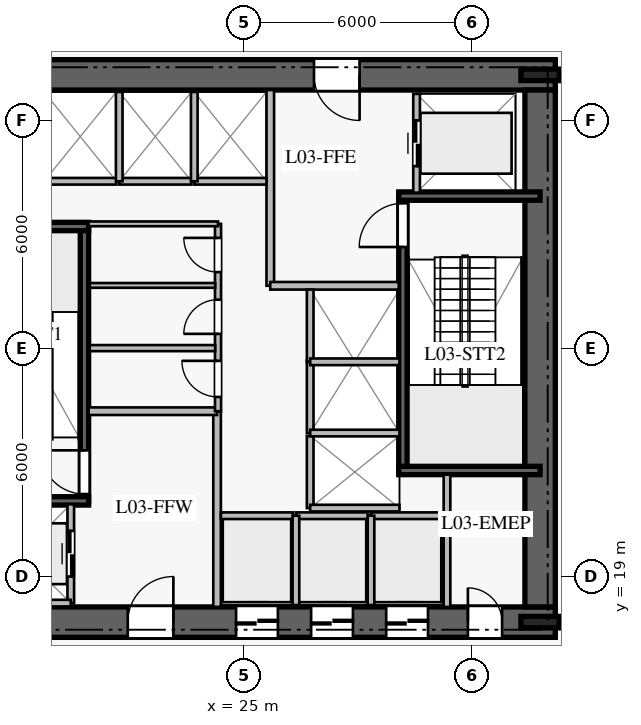
"""IFC4 building model, lengths in metres.
Left out: names, types, materials, properties, quantities, classifications, styles, units other than length and angle.
Written with IfcOpenShell. Run it as: python <this file> out.ifc"""

import sys

from ifc_helpers import new_model, si_unit, direction, frame, frame_2d, origin, origin_2d, place, context, subcontext, project, spatial, rectangle, i_section, extrude, element, fill, save


model = new_model("IFC4")
c1 = context("Model", 3, precision=1e-05, world=origin(), true_north=direction((0.0, 1.0)))
c2 = subcontext(c1, "Body", "Model", "MODEL_VIEW")
j1 = project(units=[si_unit("LENGTHUNIT", "METRE"), si_unit("PLANEANGLEUNIT", "RADIAN")], contexts=[c1])
p1 = place(None, origin())
s1 = spatial("IfcSite", under=j1, at=p1, CompositionType="ELEMENT")
p2 = place(p1, origin())
s2 = spatial("IfcBuilding", under=s1, at=p2, CompositionType="ELEMENT")
p3 = place(p2, frame((0.0, 0.0, 14.4)))
s3 = spatial("IfcBuildingStorey", under=s2, at=p3, CompositionType="ELEMENT", Elevation=14.4)
p4 = place(p3, frame((16.8, 17.8, 0.0), z_axis=(0.0, 0.0, 1.0), x_axis=(1.0, 0.0, 0.0)))
e1 = element("IfcWall", 1, at=p4, inside=s3, PredefinedType="SHEAR", context=c2, shape_type="SweptSolid", body=[
    extrude(rectangle(XDim=16.4, YDim=0.8, at=frame_2d((8.2, 0.0))), origin(), (0.0, 0.0, 1.0), 4.3),
])
p5 = place(p4, frame((5.15, 0.0, 0.0)))
e2 = element("IfcOpeningElement", 2, at=p5, cuts=e1, PredefinedType="OPENING", context=c2, shape_type="SweptSolid", body=[
    extrude(rectangle(XDim=1.2, YDim=2.25, at=frame_2d((0.6, 1.125))), frame((0.0, 0.41, 0.0), z_axis=(0.0, -1.0, 0.0), x_axis=(1.0, 0.0, 0.0)), (0.0, 0.0, 1.0), 0.82),
])
p6 = place(p4, frame((14.1, 0.0, 0.0)))
e3 = element("IfcOpeningElement", 3, at=p6, cuts=e1, PredefinedType="OPENING", context=c2, shape_type="SweptSolid", body=[
    extrude(rectangle(XDim=0.9, YDim=2.1, at=frame_2d((0.45, 1.05))), frame((0.0, 0.41, 0.0), z_axis=(0.0, -1.0, 0.0), x_axis=(1.0, 0.0, 0.0)), (0.0, 0.0, 1.0), 0.82),
])
p7 = place(p4, frame((8.0, 0.0, 0.0)))
e4 = element("IfcOpeningElement", 4, at=p7, cuts=e1, PredefinedType="OPENING", context=c2, shape_type="SweptSolid", body=[
    extrude(rectangle(XDim=1.1, YDim=2.2, at=frame_2d((0.55, 1.1))), frame((0.0, 0.41, 0.0), z_axis=(0.0, -1.0, 0.0), x_axis=(1.0, 0.0, 0.0)), (0.0, 0.0, 1.0), 0.82),
])
p8 = place(p4, frame((9.975, 0.0, 0.0)))
e5 = element("IfcOpeningElement", 5, at=p8, cuts=e1, PredefinedType="OPENING", context=c2, shape_type="SweptSolid", body=[
    extrude(rectangle(XDim=1.1, YDim=2.2, at=frame_2d((0.55, 1.1))), frame((0.0, 0.41, 0.0), z_axis=(0.0, -1.0, 0.0), x_axis=(1.0, 0.0, 0.0)), (0.0, 0.0, 1.0), 0.82),
])
p9 = place(p4, frame((11.95, 0.0, 0.0)))
e6 = element("IfcOpeningElement", 6, at=p9, cuts=e1, PredefinedType="OPENING", context=c2, shape_type="SweptSolid", body=[
    extrude(rectangle(XDim=1.1, YDim=2.2, at=frame_2d((0.55, 1.1))), frame((0.0, 0.41, 0.0), z_axis=(0.0, -1.0, 0.0), x_axis=(1.0, 0.0, 0.0)), (0.0, 0.0, 1.0), 0.82),
])
p10 = place(p3, frame((33.2, 32.2, 0.0), z_axis=(0.0, 0.0, 1.0), x_axis=(-1.0, 0.0, 0.0)))
e7 = element("IfcWall", 7, at=p10, inside=s3, PredefinedType="SHEAR", context=c2, shape_type="SweptSolid", body=[
    extrude(rectangle(XDim=16.4, YDim=0.8, at=frame_2d((8.2, 0.0))), origin(), (0.0, 0.0, 1.0), 4.3),
])
p11 = place(p10, frame((5.15, 0.0, 0.0)))
e8 = element("IfcOpeningElement", 8, at=p11, cuts=e7, PredefinedType="OPENING", context=c2, shape_type="SweptSolid", body=[
    extrude(rectangle(XDim=1.2, YDim=2.25, at=frame_2d((0.6, 1.125))), frame((0.0, 0.41, 0.0), z_axis=(0.0, -1.0, 0.0), x_axis=(1.0, 0.0, 0.0)), (0.0, 0.0, 1.0), 0.82),
])
p12 = place(p3, frame((32.8, 18.2, 0.0), z_axis=(0.0, 0.0, 1.0), x_axis=(0.0, 1.0, 0.0)))
e9 = element("IfcWall", 9, at=p12, inside=s3, PredefinedType="SHEAR", context=c2, shape_type="SweptSolid", body=[
    extrude(rectangle(XDim=13.6, YDim=0.8, at=frame_2d((6.8, 0.0))), origin(), (0.0, 0.0, 1.0), 4.3),
])
for number, where, z_axis, x_axis in (
    (10, (32.8, 17.8, 0.0), (0.0, 0.0, 1.0), (1.0, 0.0, 0.0)),
    (11, (32.8, 32.2, 0.0), (0.0, 0.0, 1.0), (1.0, 0.0, 0.0)),
):
    element("IfcColumn", number, at=place(p3, frame(where, z_axis=z_axis, x_axis=x_axis)), inside=s3, PredefinedType="COLUMN", context=c2, shape_type="SweptSolid", body=[
        extrude(i_section(OverallWidth=0.302, OverallDepth=1.008, WebThickness=0.021, FlangeThickness=0.04, at=origin_2d()), origin(), (0.0, 0.0, 1.0), 4.6),
    ])
p13 = place(p3, frame((20.81, 20.99, 0.0), z_axis=(0.0, 0.0, 1.0), x_axis=(0.0, 1.0, 0.0)))
e12 = element("IfcWall", 12, at=p13, inside=s3, PredefinedType="SOLIDWALL", context=c2, shape_type="SweptSolid", body=[
    extrude(rectangle(XDim=7.22, YDim=0.22, at=frame_2d((3.61, 0.0))), origin(), (0.0, 0.0, 1.0), 4.3),
])
p14 = place(p13, frame((0.18, 0.0, 0.0)))
e13 = element("IfcOpeningElement", 13, at=p14, cuts=e12, PredefinedType="OPENING", context=c2, shape_type="SweptSolid", body=[
    extrude(rectangle(XDim=1.15, YDim=2.2, at=frame_2d((0.575, 1.1))), frame((0.0, 0.12, 0.0), z_axis=(0.0, -1.0, 0.0), x_axis=(1.0, 0.0, 0.0)), (0.0, 0.0, 1.0), 0.24),
])
for number, where, z_axis, x_axis in (
    (14, (17.2, 20.99, 0.0), (0.0, 0.0, 1.0), (1.0, 0.0, 0.0)),
    (15, (17.2, 28.21, 0.0), (0.0, 0.0, 1.0), (1.0, 0.0, 0.0)),
):
    element("IfcWall", number, at=place(p3, frame(where, z_axis=z_axis, x_axis=x_axis)), inside=s3, PredefinedType="SOLIDWALL", context=c2, shape_type="SweptSolid", body=[
        extrude(rectangle(XDim=3.72, YDim=0.22, at=frame_2d((1.86, 0.0))), origin(), (0.0, 0.0, 1.0), 4.3),
    ])
p15 = place(p3, frame((29.19, 21.79, 0.0), z_axis=(0.0, 0.0, 1.0), x_axis=(0.0, 1.0, 0.0)))
e16 = element("IfcWall", 16, at=p15, inside=s3, PredefinedType="SOLIDWALL", context=c2, shape_type="SweptSolid", body=[
    extrude(rectangle(XDim=7.22, YDim=0.22, at=frame_2d((3.61, 0.0))), origin(), (0.0, 0.0, 1.0), 4.3),
])
p16 = place(p15, frame((5.88, 0.0, 0.0)))
e17 = element("IfcOpeningElement", 17, at=p16, cuts=e16, PredefinedType="OPENING", context=c2, shape_type="SweptSolid", body=[
    extrude(rectangle(XDim=1.15, YDim=2.2, at=frame_2d((0.575, 1.1))), frame((0.0, 0.12, 0.0), z_axis=(0.0, -1.0, 0.0), x_axis=(1.0, 0.0, 0.0)), (0.0, 0.0, 1.0), 0.24),
])
for number, where, z_axis, x_axis in (
    (18, (29.08, 21.79, 0.0), (0.0, 0.0, 1.0), (1.0, 0.0, 0.0)),
    (19, (29.08, 29.01, 0.0), (0.0, 0.0, 1.0), (1.0, 0.0, 0.0)),
):
    element("IfcWall", number, at=place(p3, frame(where, z_axis=z_axis, x_axis=x_axis)), inside=s3, PredefinedType="SOLIDWALL", context=c2, shape_type="SweptSolid", body=[
        extrude(rectangle(XDim=3.72, YDim=0.22, at=frame_2d((1.86, 0.0))), origin(), (0.0, 0.0, 1.0), 4.3),
    ])
p17 = place(p3, frame((24.3, 18.2, 0.0), z_axis=(0.0, 0.0, 1.0), x_axis=(0.0, 1.0, 0.0)))
e20 = element("IfcWall", 20, at=p17, inside=s3, PredefinedType="PARTITIONING", context=c2, shape_type="SweptSolid", body=[
    extrude(rectangle(XDim=5.15, YDim=0.2, at=frame_2d((2.575, 0.0))), origin(), (0.0, 0.0, 1.0), 4.3),
])
p18 = place(p3, frame((20.92, 23.35, 0.0), z_axis=(0.0, 0.0, 1.0), x_axis=(1.0, 0.0, 0.0)))
e21 = element("IfcWall", 21, at=p18, inside=s3, PredefinedType="PARTITIONING", context=c2, shape_type="SweptSolid", body=[
    extrude(rectangle(XDim=3.38, YDim=0.2, at=frame_2d((1.69, 0.0))), origin(), (0.0, 0.0, 1.0), 4.3),
])
p19 = place(p3, frame((25.7, 26.65, 0.0), z_axis=(0.0, 0.0, 1.0), x_axis=(0.0, 1.0, 0.0)))
e22 = element("IfcWall", 22, at=p19, inside=s3, PredefinedType="PARTITIONING", context=c2, shape_type="SweptSolid", body=[
    extrude(rectangle(XDim=5.15, YDim=0.2, at=frame_2d((2.575, 0.0))), origin(), (0.0, 0.0, 1.0), 4.3),
])
p20 = place(p3, frame((25.7, 26.65, 0.0), z_axis=(0.0, 0.0, 1.0), x_axis=(1.0, 0.0, 0.0)))
e23 = element("IfcWall", 23, at=p20, inside=s3, PredefinedType="PARTITIONING", context=c2, shape_type="SweptSolid", body=[
    extrude(rectangle(XDim=3.38, YDim=0.2, at=frame_2d((1.69, 0.0))), origin(), (0.0, 0.0, 1.0), 4.3),
])
p21 = place(p3, frame((24.325, 23.35, 0.0), z_axis=(0.0, 0.0, 1.0), x_axis=(0.0, 1.0, 0.0)))
e24 = element("IfcWall", 24, at=p21, inside=s3, PredefinedType="PLUMBINGWALL", context=c2, shape_type="SweptSolid", body=[
    extrude(rectangle(XDim=4.93, YDim=0.16, at=frame_2d((2.465, 0.0))), origin(), (0.0, 0.0, 1.0), 4.3),
])
p22 = place(p21, frame((0.375, 0.0, 0.0)))
e25 = element("IfcOpeningElement", 25, at=p22, cuts=e24, PredefinedType="OPENING", context=c2, shape_type="SweptSolid", body=[
    extrude(rectangle(XDim=0.95, YDim=2.1, at=frame_2d((0.475, 1.05))), frame((0.0, 0.09, 0.0), z_axis=(0.0, -1.0, 0.0), x_axis=(1.0, 0.0, 0.0)), (0.0, 0.0, 1.0), 0.18),
])
p23 = place(p21, frame((2.035, 0.0, 0.0)))
e26 = element("IfcOpeningElement", 26, at=p23, cuts=e24, PredefinedType="OPENING", context=c2, shape_type="SweptSolid", body=[
    extrude(rectangle(XDim=0.9, YDim=2.1, at=frame_2d((0.45, 1.05))), frame((0.0, 0.09, 0.0), z_axis=(0.0, -1.0, 0.0), x_axis=(1.0, 0.0, 0.0)), (0.0, 0.0, 1.0), 0.18),
])
p24 = place(p21, frame((3.66, 0.0, 0.0)))
e27 = element("IfcOpeningElement", 27, at=p24, cuts=e24, PredefinedType="OPENING", context=c2, shape_type="SweptSolid", body=[
    extrude(rectangle(XDim=0.9, YDim=2.1, at=frame_2d((0.45, 1.05))), frame((0.0, 0.09, 0.0), z_axis=(0.0, -1.0, 0.0), x_axis=(1.0, 0.0, 0.0)), (0.0, 0.0, 1.0), 0.18),
])
p25 = place(p3, frame((20.92, 28.28, 0.0), z_axis=(0.0, 0.0, 1.0), x_axis=(1.0, 0.0, 0.0)))
e28 = element("IfcWall", 28, at=p25, inside=s3, PredefinedType="PARTITIONING", context=c2, shape_type="SweptSolid", body=[
    extrude(rectangle(XDim=3.405, YDim=0.125, at=frame_2d((1.703, 0.0))), origin(), (0.0, 0.0, 1.0), 4.3),
])
p26 = place(p3, frame((20.95, 25.01, 0.0), z_axis=(0.0, 0.0, 1.0), x_axis=(1.0, 0.0, 0.0)))
e29 = element("IfcWall", 29, at=p26, inside=s3, PredefinedType="PLUMBINGWALL", context=c2, shape_type="SweptSolid", body=[
    extrude(rectangle(XDim=3.3, YDim=0.16, at=frame_2d((1.65, 0.0))), origin(), (0.0, 0.0, 1.0), 4.3),
])
p27 = place(p3, frame((20.95, 26.66, 0.0), z_axis=(0.0, 0.0, 1.0), x_axis=(1.0, 0.0, 0.0)))
e30 = element("IfcWall", 30, at=p27, inside=s3, PredefinedType="PARTITIONING", context=c2, shape_type="SweptSolid", body=[
    extrude(rectangle(XDim=3.3, YDim=0.125, at=frame_2d((1.65, 0.0))), origin(), (0.0, 0.0, 1.0), 4.3),
])
p28 = place(p3, frame((30.35, 18.2, 0.0), z_axis=(0.0, 0.0, 1.0), x_axis=(0.0, 1.0, 0.0)))
e31 = element("IfcWall", 31, at=p28, inside=s3, PredefinedType="PARTITIONING", context=c2, shape_type="SweptSolid", body=[
    extrude(rectangle(XDim=3.48, YDim=0.175, at=frame_2d((1.74, 0.0))), origin(), (0.0, 0.0, 1.0), 4.3),
])
p29 = place(p3, frame((24.4, 20.6, 0.0), z_axis=(0.0, 0.0, 1.0), x_axis=(1.0, 0.0, 0.0)))
e32 = element("IfcWall", 32, at=p29, inside=s3, PredefinedType="PARTITIONING", context=c2, shape_type="SweptSolid", body=[
    extrude(rectangle(XDim=1.9, YDim=0.175, at=frame_2d((0.95, 0.0))), origin(), (0.0, 0.0, 1.0), 4.3),
])
p30 = place(p3, frame((26.375, 20.6, 0.0), z_axis=(0.0, 0.0, 1.0), x_axis=(1.0, 0.0, 0.0)))
e33 = element("IfcWall", 33, at=p30, inside=s3, PredefinedType="PARTITIONING", context=c2, shape_type="SweptSolid", body=[
    extrude(rectangle(XDim=1.9, YDim=0.175, at=frame_2d((0.95, 0.0))), origin(), (0.0, 0.0, 1.0), 4.3),
])
p31 = place(p3, frame((26.375, 18.25, 0.0), z_axis=(0.0, 0.0, 1.0), x_axis=(0.0, 1.0, 0.0)))
e34 = element("IfcWall", 34, at=p31, inside=s3, PredefinedType="PARTITIONING", context=c2, shape_type="SweptSolid", body=[
    extrude(rectangle(XDim=2.35, YDim=0.175, at=frame_2d((1.175, 0.0))), origin(), (0.0, 0.0, 1.0), 4.3),
])
p32 = place(p3, frame((28.35, 20.6, 0.0), z_axis=(0.0, 0.0, 1.0), x_axis=(1.0, 0.0, 0.0)))
e35 = element("IfcWall", 35, at=p32, inside=s3, PredefinedType="PARTITIONING", context=c2, shape_type="SweptSolid", body=[
    extrude(rectangle(XDim=1.9, YDim=0.175, at=frame_2d((0.95, 0.0))), origin(), (0.0, 0.0, 1.0), 4.3),
])
p33 = place(p3, frame((28.35, 18.25, 0.0), z_axis=(0.0, 0.0, 1.0), x_axis=(0.0, 1.0, 0.0)))
e36 = element("IfcWall", 36, at=p33, inside=s3, PredefinedType="PARTITIONING", context=c2, shape_type="SweptSolid", body=[
    extrude(rectangle(XDim=2.35, YDim=0.175, at=frame_2d((1.175, 0.0))), origin(), (0.0, 0.0, 1.0), 4.3),
])
for number, where, z_axis, x_axis in (
    (37, (19.75, 29.4, 0.0), (0.0, 0.0, 1.0), (1.0, 0.0, 0.0)),
    (38, (21.725, 29.4, 0.0), (0.0, 0.0, 1.0), (1.0, 0.0, 0.0)),
):
    element("IfcWall", number, at=place(p3, frame(where, z_axis=z_axis, x_axis=x_axis)), inside=s3, PredefinedType="PARTITIONING", context=c2, shape_type="SweptSolid", body=[
        extrude(rectangle(XDim=1.9, YDim=0.175, at=frame_2d((0.95, 0.0))), origin(), (0.0, 0.0, 1.0), 4.3),
    ])
p34 = place(p3, frame((21.725, 29.4, 0.0), z_axis=(0.0, 0.0, 1.0), x_axis=(0.0, 1.0, 0.0)))
e39 = element("IfcWall", 39, at=p34, inside=s3, PredefinedType="PARTITIONING", context=c2, shape_type="SweptSolid", body=[
    extrude(rectangle(XDim=2.35, YDim=0.175, at=frame_2d((1.175, 0.0))), origin(), (0.0, 0.0, 1.0), 4.3),
])
p35 = place(p3, frame((23.7, 29.4, 0.0), z_axis=(0.0, 0.0, 1.0), x_axis=(1.0, 0.0, 0.0)))
e40 = element("IfcWall", 40, at=p35, inside=s3, PredefinedType="PARTITIONING", context=c2, shape_type="SweptSolid", body=[
    extrude(rectangle(XDim=1.9, YDim=0.175, at=frame_2d((0.95, 0.0))), origin(), (0.0, 0.0, 1.0), 4.3),
])
p36 = place(p3, frame((23.7, 29.4, 0.0), z_axis=(0.0, 0.0, 1.0), x_axis=(0.0, 1.0, 0.0)))
e41 = element("IfcWall", 41, at=p36, inside=s3, PredefinedType="PARTITIONING", context=c2, shape_type="SweptSolid", body=[
    extrude(rectangle(XDim=2.35, YDim=0.175, at=frame_2d((1.175, 0.0))), origin(), (0.0, 0.0, 1.0), 4.3),
])
p37 = place(p3, frame((26.75, 20.8, 0.0), z_axis=(0.0, 0.0, 1.0), x_axis=(0.0, 1.0, 0.0)))
e42 = element("IfcWall", 42, at=p37, inside=s3, PredefinedType="PARTITIONING", context=c2, shape_type="SweptSolid", body=[
    extrude(rectangle(XDim=1.9, YDim=0.175, at=frame_2d((0.95, 0.0))), origin(), (0.0, 0.0, 1.0), 4.3),
])
p38 = place(p3, frame((26.75, 20.8, 0.0), z_axis=(0.0, 0.0, 1.0), x_axis=(1.0, 0.0, 0.0)))
e43 = element("IfcWall", 43, at=p38, inside=s3, PredefinedType="PARTITIONING", context=c2, shape_type="SweptSolid", body=[
    extrude(rectangle(XDim=2.35, YDim=0.175, at=frame_2d((1.175, 0.0))), origin(), (0.0, 0.0, 1.0), 4.3),
])
p39 = place(p3, frame((26.75, 22.775, 0.0), z_axis=(0.0, 0.0, 1.0), x_axis=(0.0, 1.0, 0.0)))
e44 = element("IfcWall", 44, at=p39, inside=s3, PredefinedType="PARTITIONING", context=c2, shape_type="SweptSolid", body=[
    extrude(rectangle(XDim=1.9, YDim=0.175, at=frame_2d((0.95, 0.0))), origin(), (0.0, 0.0, 1.0), 4.3),
])
p40 = place(p3, frame((26.75, 22.775, 0.0), z_axis=(0.0, 0.0, 1.0), x_axis=(1.0, 0.0, 0.0)))
e45 = element("IfcWall", 45, at=p40, inside=s3, PredefinedType="PARTITIONING", context=c2, shape_type="SweptSolid", body=[
    extrude(rectangle(XDim=2.35, YDim=0.175, at=frame_2d((1.175, 0.0))), origin(), (0.0, 0.0, 1.0), 4.3),
])
p41 = place(p3, frame((26.75, 24.65, 0.0), z_axis=(0.0, 0.0, 1.0), x_axis=(0.0, 1.0, 0.0)))
e46 = element("IfcWall", 46, at=p41, inside=s3, PredefinedType="PARTITIONING", context=c2, shape_type="SweptSolid", body=[
    extrude(rectangle(XDim=1.9, YDim=0.175, at=frame_2d((0.95, 0.0))), origin(), (0.0, 0.0, 1.0), 4.3),
])
p42 = place(p3, frame((26.75, 24.65, 0.0), z_axis=(0.0, 0.0, 1.0), x_axis=(1.0, 0.0, 0.0)))
e47 = element("IfcWall", 47, at=p42, inside=s3, PredefinedType="PARTITIONING", context=c2, shape_type="SweptSolid", body=[
    extrude(rectangle(XDim=2.35, YDim=0.175, at=frame_2d((1.175, 0.0))), origin(), (0.0, 0.0, 1.0), 4.3),
])
p43 = place(p3, frame((20.45, 18.3, 0.0), z_axis=(0.0, 0.0, 1.0), x_axis=(0.0, 1.0, 0.0)))
e48 = element("IfcWall", 48, at=p43, inside=s3, PredefinedType="PARTITIONING", context=c2, shape_type="SweptSolid", body=[
    extrude(rectangle(XDim=2.6, YDim=0.175, at=frame_2d((1.3, 0.0))), origin(), (0.0, 0.0, 1.0), 4.3),
])
p44 = place(p43, frame((0.7, 0.0, 0.0)))
e49 = element("IfcOpeningElement", 49, at=p44, cuts=e48, PredefinedType="OPENING", context=c2, shape_type="SweptSolid", body=[
    extrude(rectangle(XDim=1.2, YDim=2.2, at=frame_2d((0.6, 1.1))), frame((0.0, 0.098, 0.0), z_axis=(0.0, -1.0, 0.0), x_axis=(1.0, 0.0, 0.0)), (0.0, 0.0, 1.0), 0.195),
])
p45 = place(p3, frame((17.85, 18.3, 0.0), z_axis=(0.0, 0.0, 1.0), x_axis=(1.0, 0.0, 0.0)))
e50 = element("IfcWall", 50, at=p45, inside=s3, PredefinedType="PARTITIONING", context=c2, shape_type="SweptSolid", body=[
    extrude(rectangle(XDim=2.6, YDim=0.175, at=frame_2d((1.3, 0.0))), origin(), (0.0, 0.0, 1.0), 4.3),
])
p46 = place(p3, frame((29.55, 29.1, 0.0), z_axis=(0.0, 0.0, 1.0), x_axis=(0.0, 1.0, 0.0)))
e51 = element("IfcWall", 51, at=p46, inside=s3, PredefinedType="PARTITIONING", context=c2, shape_type="SweptSolid", body=[
    extrude(rectangle(XDim=2.6, YDim=0.175, at=frame_2d((1.3, 0.0))), origin(), (0.0, 0.0, 1.0), 4.3),
])
p47 = place(p46, frame((0.7, 0.0, 0.0)))
e52 = element("IfcOpeningElement", 52, at=p47, cuts=e51, PredefinedType="OPENING", context=c2, shape_type="SweptSolid", body=[
    extrude(rectangle(XDim=1.2, YDim=2.2, at=frame_2d((0.6, 1.1))), frame((0.0, 0.098, 0.0), z_axis=(0.0, -1.0, 0.0), x_axis=(1.0, 0.0, 0.0)), (0.0, 0.0, 1.0), 0.195),
])
p48 = place(p14, origin())
e53 = element("IfcDoor", 53, at=p48, inside=s3, OperationType="SINGLE_SWING_RIGHT", PredefinedType="DOOR", context=c2, shape_type="SweptSolid", body=[
    extrude(rectangle(XDim=1.15, YDim=2.2, at=frame_2d((0.575, 1.1))), frame((0.0, 0.025, 0.0), z_axis=(0.0, -1.0, 0.0), x_axis=(1.0, 0.0, 0.0)), (0.0, 0.0, 1.0), 0.05),
])
fill(e13, e53)
p49 = place(p16, origin())
e54 = element("IfcDoor", 54, at=p49, inside=s3, OperationType="SINGLE_SWING_LEFT", PredefinedType="DOOR", context=c2, shape_type="SweptSolid", body=[
    extrude(rectangle(XDim=1.15, YDim=2.2, at=frame_2d((0.575, 1.1))), frame((0.0, 0.025, 0.0), z_axis=(0.0, -1.0, 0.0), x_axis=(1.0, 0.0, 0.0)), (0.0, 0.0, 1.0), 0.05),
])
fill(e17, e54)
p50 = place(p5, origin())
e55 = element("IfcDoor", 55, at=p50, inside=s3, OperationType="SINGLE_SWING_RIGHT", PredefinedType="DOOR", context=c2, shape_type="SweptSolid", body=[
    extrude(rectangle(XDim=1.2, YDim=2.25, at=frame_2d((0.6, 1.125))), frame((0.0, 0.025, 0.0), z_axis=(0.0, -1.0, 0.0), x_axis=(1.0, 0.0, 0.0)), (0.0, 0.0, 1.0), 0.05),
])
fill(e2, e55)
p51 = place(p11, origin())
e56 = element("IfcDoor", 56, at=p51, inside=s3, OperationType="SINGLE_SWING_LEFT", PredefinedType="DOOR", context=c2, shape_type="SweptSolid", body=[
    extrude(rectangle(XDim=1.2, YDim=2.25, at=frame_2d((0.6, 1.125))), frame((0.0, 0.025, 0.0), z_axis=(0.0, -1.0, 0.0), x_axis=(1.0, 0.0, 0.0)), (0.0, 0.0, 1.0), 0.05),
])
fill(e8, e56)
p52 = place(p22, origin())
e57 = element("IfcDoor", 57, at=p52, inside=s3, OperationType="SINGLE_SWING_RIGHT", PredefinedType="DOOR", context=c2, shape_type="SweptSolid", body=[
    extrude(rectangle(XDim=0.95, YDim=2.1, at=frame_2d((0.475, 1.05))), frame((0.0, 0.025, 0.0), z_axis=(0.0, -1.0, 0.0), x_axis=(1.0, 0.0, 0.0)), (0.0, 0.0, 1.0), 0.05),
])
fill(e25, e57)
p53 = place(p23, origin())
e58 = element("IfcDoor", 58, at=p53, inside=s3, OperationType="SINGLE_SWING_LEFT", PredefinedType="DOOR", context=c2, shape_type="SweptSolid", body=[
    extrude(rectangle(XDim=0.9, YDim=2.1, at=frame_2d((0.45, 1.05))), frame((0.0, 0.025, 0.0), z_axis=(0.0, -1.0, 0.0), x_axis=(1.0, 0.0, 0.0)), (0.0, 0.0, 1.0), 0.05),
])
fill(e26, e58)
p54 = place(p24, origin())
e59 = element("IfcDoor", 59, at=p54, inside=s3, OperationType="SINGLE_SWING_RIGHT", PredefinedType="DOOR", context=c2, shape_type="SweptSolid", body=[
    extrude(rectangle(XDim=0.9, YDim=2.1, at=frame_2d((0.45, 1.05))), frame((0.0, 0.025, 0.0), z_axis=(0.0, -1.0, 0.0), x_axis=(1.0, 0.0, 0.0)), (0.0, 0.0, 1.0), 0.05),
])
fill(e27, e59)
p55 = place(p6, origin())
e60 = element("IfcDoor", 60, at=p55, inside=s3, OperationType="SINGLE_SWING_LEFT", PredefinedType="DOOR", context=c2, shape_type="SweptSolid", body=[
    extrude(rectangle(XDim=0.9, YDim=2.1, at=frame_2d((0.45, 1.05))), frame((0.0, 0.025, 0.0), z_axis=(0.0, -1.0, 0.0), x_axis=(1.0, 0.0, 0.0)), (0.0, 0.0, 1.0), 0.05),
])
fill(e3, e60)
p56 = place(p7, origin())
e61 = element("IfcDoor", 61, at=p56, inside=s3, OperationType="DOUBLE_DOOR_SLIDING", PredefinedType="DOOR", context=c2, shape_type="SweptSolid", body=[
    extrude(rectangle(XDim=1.1, YDim=2.2, at=frame_2d((0.55, 1.1))), frame((0.0, 0.025, 0.0), z_axis=(0.0, -1.0, 0.0), x_axis=(1.0, 0.0, 0.0)), (0.0, 0.0, 1.0), 0.05),
])
fill(e4, e61)
p57 = place(p8, origin())
e62 = element("IfcDoor", 62, at=p57, inside=s3, OperationType="DOUBLE_DOOR_SLIDING", PredefinedType="DOOR", context=c2, shape_type="SweptSolid", body=[
    extrude(rectangle(XDim=1.1, YDim=2.2, at=frame_2d((0.55, 1.1))), frame((0.0, 0.025, 0.0), z_axis=(0.0, -1.0, 0.0), x_axis=(1.0, 0.0, 0.0)), (0.0, 0.0, 1.0), 0.05),
])
fill(e5, e62)
p58 = place(p9, origin())
e63 = element("IfcDoor", 63, at=p58, inside=s3, OperationType="DOUBLE_DOOR_SLIDING", PredefinedType="DOOR", context=c2, shape_type="SweptSolid", body=[
    extrude(rectangle(XDim=1.1, YDim=2.2, at=frame_2d((0.55, 1.1))), frame((0.0, 0.025, 0.0), z_axis=(0.0, -1.0, 0.0), x_axis=(1.0, 0.0, 0.0)), (0.0, 0.0, 1.0), 0.05),
])
fill(e6, e63)
p59 = place(p44, origin())
e64 = element("IfcDoor", 64, at=p59, inside=s3, OperationType="DOUBLE_DOOR_SLIDING", PredefinedType="DOOR", context=c2, shape_type="SweptSolid", body=[
    extrude(rectangle(XDim=1.2, YDim=2.2, at=frame_2d((0.6, 1.1))), frame((0.0, 0.025, 0.0), z_axis=(0.0, -1.0, 0.0), x_axis=(1.0, 0.0, 0.0)), (0.0, 0.0, 1.0), 0.05),
])
fill(e49, e64)
p60 = place(p47, origin())
e65 = element("IfcDoor", 65, at=p60, inside=s3, OperationType="DOUBLE_DOOR_SLIDING", PredefinedType="DOOR", context=c2, shape_type="SweptSolid", body=[
    extrude(rectangle(XDim=1.2, YDim=2.2, at=frame_2d((0.6, 1.1))), frame((0.0, 0.025, 0.0), z_axis=(0.0, -1.0, 0.0), x_axis=(1.0, 0.0, 0.0)), (0.0, 0.0, 1.0), 0.05),
])
fill(e52, e65)
save(model, sys.argv[1])
